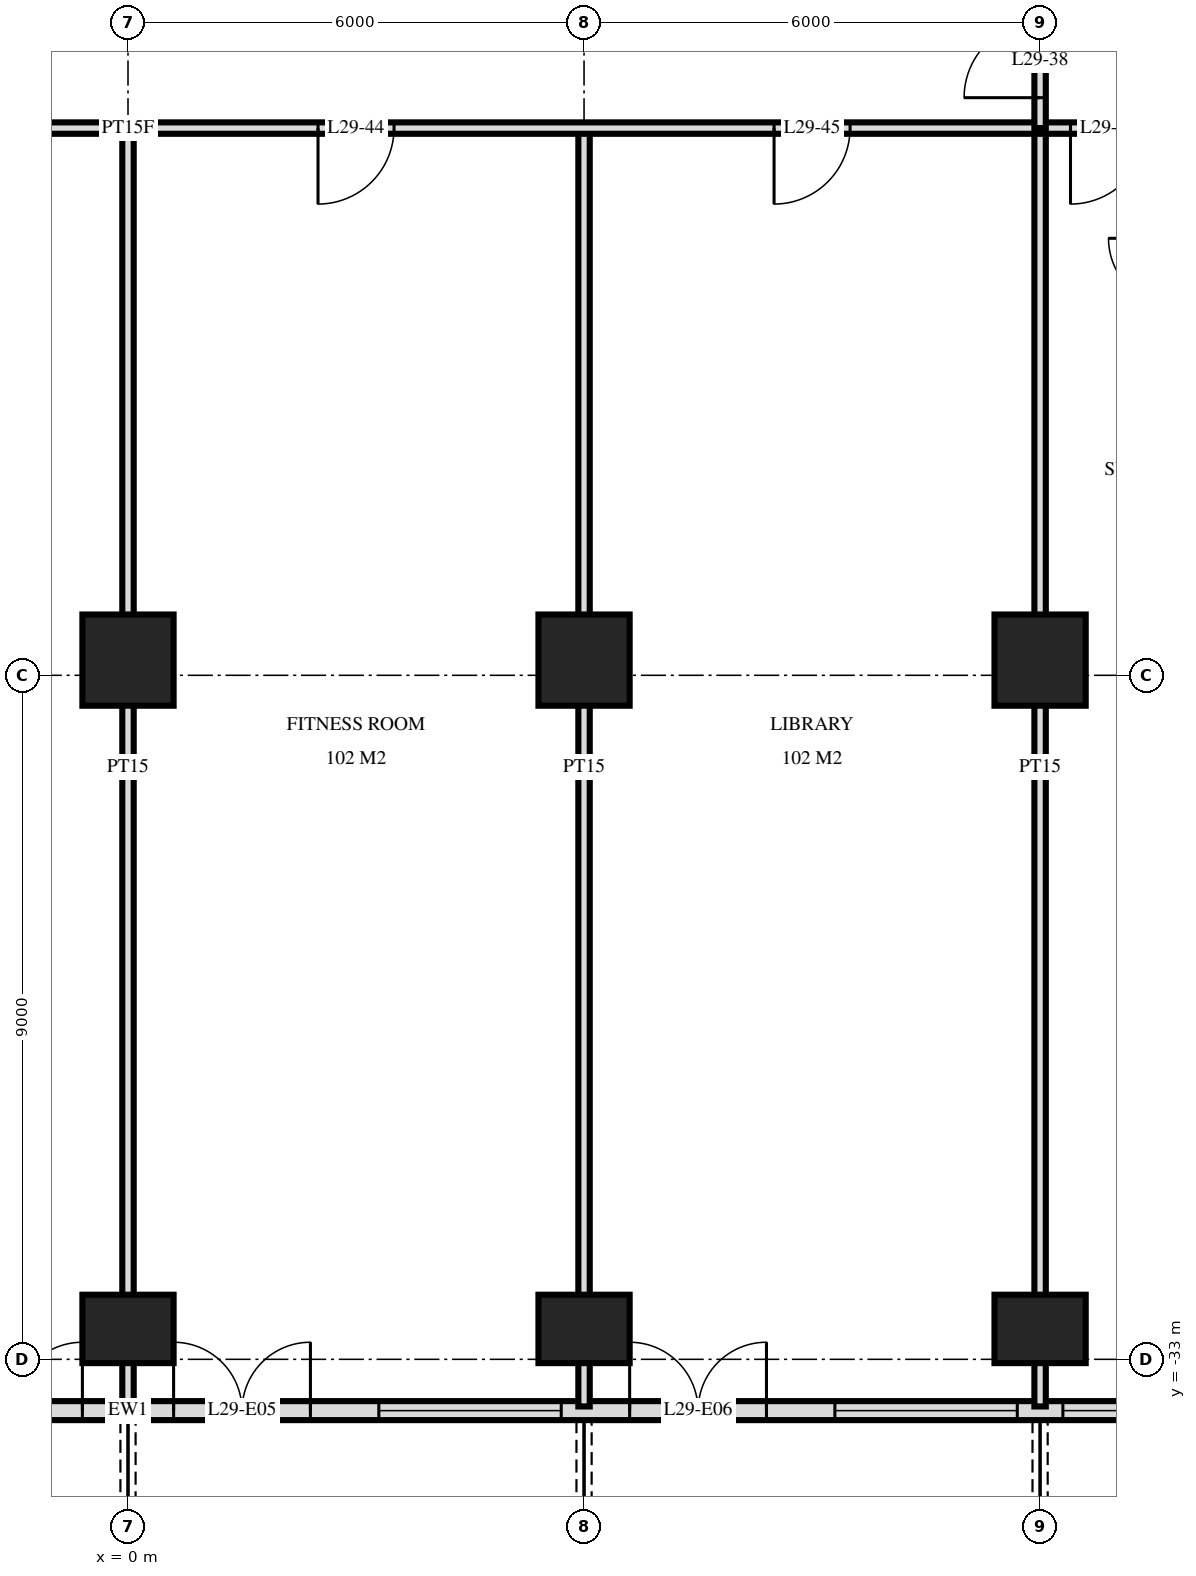
"""IFC4 building model, lengths in metres.
Left out: names, types, materials, properties, quantities, classifications, styles, units other than length and angle.
Written with IfcOpenShell. Run it as: python <this file> out.ifc"""

import sys

from ifc_helpers import new_model, si_unit, direction, frame, frame_2d, origin, origin_2d, place, context, subcontext, project, spatial, rectangle, extrude, element, fill, save


model = new_model("IFC4")
c1 = context("Model", 3, precision=1e-05, world=origin(), true_north=direction((0.0, 1.0)))
c2 = subcontext(c1, "Body", "Model", "MODEL_VIEW")
j1 = project(units=[si_unit("LENGTHUNIT", "METRE"), si_unit("PLANEANGLEUNIT", "RADIAN")], contexts=[c1])
p1 = place(None, origin())
s1 = spatial("IfcSite", under=j1, at=p1, CompositionType="ELEMENT")
p2 = place(p1, origin())
s2 = spatial("IfcBuilding", under=s1, at=p2, CompositionType="ELEMENT")
p3 = place(p2, frame((0.0, 0.0, 116.4)))
s3 = spatial("IfcBuildingStorey", under=s2, at=p3, CompositionType="ELEMENT", Elevation=116.4)
p4 = place(p3, frame((0.0, -32.6, 0.0), z_axis=(0.0, 0.0, 1.0), x_axis=(1.0, 0.0, 0.0)))
e1 = element("IfcColumn", 1, at=p4, inside=s3, PredefinedType="COLUMN", context=c2, shape_type="SweptSolid", body=[
    extrude(rectangle(XDim=1.2, YDim=0.9, at=origin_2d()), origin(), (0.0, 0.0, 1.0), 3.6),
])
p5 = place(p3, frame((0.0, -23.8, 0.0), z_axis=(0.0, 0.0, 1.0), x_axis=(1.0, 0.0, 0.0)))
e2 = element("IfcColumn", 2, at=p5, inside=s3, PredefinedType="COLUMN", context=c2, shape_type="SweptSolid", body=[
    extrude(rectangle(XDim=1.2, YDim=1.2, at=origin_2d()), origin(), (0.0, 0.0, 1.0), 3.6),
])
p6 = place(p3, frame((6.0, -32.6, 0.0), z_axis=(0.0, 0.0, 1.0), x_axis=(1.0, 0.0, 0.0)))
e3 = element("IfcColumn", 3, at=p6, inside=s3, PredefinedType="COLUMN", context=c2, shape_type="SweptSolid", body=[
    extrude(rectangle(XDim=1.2, YDim=0.9, at=origin_2d()), origin(), (0.0, 0.0, 1.0), 3.6),
])
p7 = place(p3, frame((6.0, -23.8, 0.0), z_axis=(0.0, 0.0, 1.0), x_axis=(1.0, 0.0, 0.0)))
e4 = element("IfcColumn", 4, at=p7, inside=s3, PredefinedType="COLUMN", context=c2, shape_type="SweptSolid", body=[
    extrude(rectangle(XDim=1.2, YDim=1.2, at=origin_2d()), origin(), (0.0, 0.0, 1.0), 3.6),
])
p8 = place(p3, frame((12.0, -32.6, 0.0), z_axis=(0.0, 0.0, 1.0), x_axis=(1.0, 0.0, 0.0)))
e5 = element("IfcColumn", 5, at=p8, inside=s3, PredefinedType="COLUMN", context=c2, shape_type="SweptSolid", body=[
    extrude(rectangle(XDim=1.2, YDim=0.9, at=origin_2d()), origin(), (0.0, 0.0, 1.0), 3.6),
])
p9 = place(p3, frame((12.0, -23.8, 0.0), z_axis=(0.0, 0.0, 1.0), x_axis=(1.0, 0.0, 0.0)))
e6 = element("IfcColumn", 6, at=p9, inside=s3, PredefinedType="COLUMN", context=c2, shape_type="SweptSolid", body=[
    extrude(rectangle(XDim=1.2, YDim=1.2, at=origin_2d()), origin(), (0.0, 0.0, 1.0), 3.6),
])
p10 = place(p3, frame((-23.675, -33.675, 0.0), z_axis=(0.0, 0.0, 1.0), x_axis=(1.0, 0.0, 0.0)))
e7 = element("IfcWall", 7, at=p10, inside=s3, PredefinedType="SOLIDWALL", context=c2, shape_type="SweptSolid", body=[
    extrude(rectangle(XDim=47.351, YDim=0.25, at=frame_2d((23.675, 0.0))), origin(), (0.0, 0.0, 1.0), 3.32),
])
p11 = place(p10, frame((0.275, 0.0, 0.3)))
e8 = element("IfcOpeningElement", 8, at=p11, cuts=e7, PredefinedType="OPENING", context=c2, shape_type="SweptSolid", body=[
    extrude(rectangle(XDim=2.4, YDim=2.1, at=frame_2d((1.2, 1.05))), frame((0.0, 0.135, 0.0), z_axis=(0.0, -1.0, 0.0), x_axis=(1.0, 0.0, 0.0)), (0.0, 0.0, 1.0), 0.27),
])
p12 = place(p10, frame((3.425, 0.0, 0.0)))
e9 = element("IfcOpeningElement", 9, at=p12, cuts=e7, PredefinedType="OPENING", context=c2, shape_type="SweptSolid", body=[
    extrude(rectangle(XDim=1.8, YDim=2.4, at=frame_2d((0.9, 1.2))), frame((0.0, 0.135, 0.0), z_axis=(0.0, -1.0, 0.0), x_axis=(1.0, 0.0, 0.0)), (0.0, 0.0, 1.0), 0.27),
])
p13 = place(p10, frame((5.975, 0.0, 0.3)))
e10 = element("IfcOpeningElement", 10, at=p13, cuts=e7, PredefinedType="OPENING", context=c2, shape_type="SweptSolid", body=[
    extrude(rectangle(XDim=2.4, YDim=2.1, at=frame_2d((1.2, 1.05))), frame((0.0, 0.135, 0.0), z_axis=(0.0, -1.0, 0.0), x_axis=(1.0, 0.0, 0.0)), (0.0, 0.0, 1.0), 0.27),
])
p14 = place(p10, frame((9.275, 0.0, 0.0)))
e11 = element("IfcOpeningElement", 11, at=p14, cuts=e7, PredefinedType="OPENING", context=c2, shape_type="SweptSolid", body=[
    extrude(rectangle(XDim=1.8, YDim=2.4, at=frame_2d((0.9, 1.2))), frame((0.0, 0.135, 0.0), z_axis=(0.0, -1.0, 0.0), x_axis=(1.0, 0.0, 0.0)), (0.0, 0.0, 1.0), 0.27),
])
p15 = place(p10, frame((12.275, 0.0, 0.0)))
e12 = element("IfcOpeningElement", 12, at=p15, cuts=e7, PredefinedType="OPENING", context=c2, shape_type="SweptSolid", body=[
    extrude(rectangle(XDim=1.8, YDim=2.4, at=frame_2d((0.9, 1.2))), frame((0.0, 0.135, 0.0), z_axis=(0.0, -1.0, 0.0), x_axis=(1.0, 0.0, 0.0)), (0.0, 0.0, 1.0), 0.27),
])
p16 = place(p10, frame((14.975, 0.0, 0.3)))
e13 = element("IfcOpeningElement", 13, at=p16, cuts=e7, PredefinedType="OPENING", context=c2, shape_type="SweptSolid", body=[
    extrude(rectangle(XDim=2.4, YDim=2.1, at=frame_2d((1.2, 1.05))), frame((0.0, 0.135, 0.0), z_axis=(0.0, -1.0, 0.0), x_axis=(1.0, 0.0, 0.0)), (0.0, 0.0, 1.0), 0.27),
])
p17 = place(p10, frame((17.975, 0.0, 0.3)))
e14 = element("IfcOpeningElement", 14, at=p17, cuts=e7, PredefinedType="OPENING", context=c2, shape_type="SweptSolid", body=[
    extrude(rectangle(XDim=2.4, YDim=2.1, at=frame_2d((1.2, 1.05))), frame((0.0, 0.135, 0.0), z_axis=(0.0, -1.0, 0.0), x_axis=(1.0, 0.0, 0.0)), (0.0, 0.0, 1.0), 0.27),
])
p18 = place(p10, frame((21.275, 0.0, 0.0)))
e15 = element("IfcOpeningElement", 15, at=p18, cuts=e7, PredefinedType="OPENING", context=c2, shape_type="SweptSolid", body=[
    extrude(rectangle(XDim=1.8, YDim=2.4, at=frame_2d((0.9, 1.2))), frame((0.0, 0.135, 0.0), z_axis=(0.0, -1.0, 0.0), x_axis=(1.0, 0.0, 0.0)), (0.0, 0.0, 1.0), 0.27),
])
p19 = place(p10, frame((24.275, 0.0, 0.0)))
e16 = element("IfcOpeningElement", 16, at=p19, cuts=e7, PredefinedType="OPENING", context=c2, shape_type="SweptSolid", body=[
    extrude(rectangle(XDim=1.8, YDim=2.4, at=frame_2d((0.9, 1.2))), frame((0.0, 0.135, 0.0), z_axis=(0.0, -1.0, 0.0), x_axis=(1.0, 0.0, 0.0)), (0.0, 0.0, 1.0), 0.27),
])
p20 = place(p10, frame((26.975, 0.0, 0.3)))
e17 = element("IfcOpeningElement", 17, at=p20, cuts=e7, PredefinedType="OPENING", context=c2, shape_type="SweptSolid", body=[
    extrude(rectangle(XDim=2.4, YDim=2.1, at=frame_2d((1.2, 1.05))), frame((0.0, 0.135, 0.0), z_axis=(0.0, -1.0, 0.0), x_axis=(1.0, 0.0, 0.0)), (0.0, 0.0, 1.0), 0.27),
])
p21 = place(p10, frame((30.275, 0.0, 0.0)))
e18 = element("IfcOpeningElement", 18, at=p21, cuts=e7, PredefinedType="OPENING", context=c2, shape_type="SweptSolid", body=[
    extrude(rectangle(XDim=1.8, YDim=2.4, at=frame_2d((0.9, 1.2))), frame((0.0, 0.135, 0.0), z_axis=(0.0, -1.0, 0.0), x_axis=(1.0, 0.0, 0.0)), (0.0, 0.0, 1.0), 0.27),
])
p22 = place(p10, frame((32.975, 0.0, 0.3)))
e19 = element("IfcOpeningElement", 19, at=p22, cuts=e7, PredefinedType="OPENING", context=c2, shape_type="SweptSolid", body=[
    extrude(rectangle(XDim=2.4, YDim=2.1, at=frame_2d((1.2, 1.05))), frame((0.0, 0.135, 0.0), z_axis=(0.0, -1.0, 0.0), x_axis=(1.0, 0.0, 0.0)), (0.0, 0.0, 1.0), 0.27),
])
p23 = place(p10, frame((35.975, 0.0, 0.3)))
e20 = element("IfcOpeningElement", 20, at=p23, cuts=e7, PredefinedType="OPENING", context=c2, shape_type="SweptSolid", body=[
    extrude(rectangle(XDim=2.4, YDim=2.1, at=frame_2d((1.2, 1.05))), frame((0.0, 0.135, 0.0), z_axis=(0.0, -1.0, 0.0), x_axis=(1.0, 0.0, 0.0)), (0.0, 0.0, 1.0), 0.27),
])
p24 = place(p10, frame((39.275, 0.0, 0.0)))
e21 = element("IfcOpeningElement", 21, at=p24, cuts=e7, PredefinedType="OPENING", context=c2, shape_type="SweptSolid", body=[
    extrude(rectangle(XDim=1.8, YDim=2.4, at=frame_2d((0.9, 1.2))), frame((0.0, 0.135, 0.0), z_axis=(0.0, -1.0, 0.0), x_axis=(1.0, 0.0, 0.0)), (0.0, 0.0, 1.0), 0.27),
])
p25 = place(p10, frame((41.975, 0.0, 0.3)))
e22 = element("IfcOpeningElement", 22, at=p25, cuts=e7, PredefinedType="OPENING", context=c2, shape_type="SweptSolid", body=[
    extrude(rectangle(XDim=2.4, YDim=2.1, at=frame_2d((1.2, 1.05))), frame((0.0, 0.135, 0.0), z_axis=(0.0, -1.0, 0.0), x_axis=(1.0, 0.0, 0.0)), (0.0, 0.0, 1.0), 0.27),
])
p26 = place(p10, frame((45.125, 0.0, 0.0)))
e23 = element("IfcOpeningElement", 23, at=p26, cuts=e7, PredefinedType="OPENING", context=c2, shape_type="SweptSolid", body=[
    extrude(rectangle(XDim=1.8, YDim=2.4, at=frame_2d((0.9, 1.2))), frame((0.0, 0.135, 0.0), z_axis=(0.0, -1.0, 0.0), x_axis=(1.0, 0.0, 0.0)), (0.0, 0.0, 1.0), 0.27),
])
p27 = place(p3, frame((12.0, -16.8, 0.0), z_axis=(0.0, 0.0, 1.0), x_axis=(0.0, 1.0, 0.0)))
e24 = element("IfcWall", 24, at=p27, inside=s3, PredefinedType="PARTITIONING", context=c2, shape_type="SweptSolid", body=[
    extrude(rectangle(XDim=1.75, YDim=0.15, at=frame_2d((0.875, 0.0))), origin(), (0.0, 0.0, 1.0), 3.32),
])
p28 = place(p27, frame((0.4, 0.0, 0.0)))
e25 = element("IfcOpeningElement", 25, at=p28, cuts=e24, PredefinedType="OPENING", context=c2, shape_type="SweptSolid", body=[
    extrude(rectangle(XDim=1.0, YDim=2.1, at=frame_2d((0.5, 1.05))), frame((0.0, 0.085, 0.0), z_axis=(0.0, -1.0, 0.0), x_axis=(1.0, 0.0, 0.0)), (0.0, 0.0, 1.0), 0.17),
])
for number, where, z_axis, x_axis in (
    (26, (12.0, -33.62, 0.0), (0.0, 0.0, 1.0), (0.0, 1.0, 0.0)),
    (27, (6.0, -33.62, 0.0), (0.0, 0.0, 1.0), (0.0, 1.0, 0.0)),
    (28, (0.0, -33.62, 0.0), (0.0, 0.0, 1.0), (0.0, 1.0, 0.0)),
):
    element("IfcWall", number, at=place(p3, frame(where, z_axis=z_axis, x_axis=x_axis)), inside=s3, PredefinedType="PARTITIONING", context=c2, shape_type="SweptSolid", body=[
        extrude(rectangle(XDim=16.82, YDim=0.15, at=frame_2d((8.41, 0.0))), origin(), (0.0, 0.0, 1.0), 3.32),
    ])
p29 = place(p3, frame((-28.02, -16.8, 0.0), z_axis=(0.0, 0.0, 1.0), x_axis=(1.0, 0.0, 0.0)))
e29 = element("IfcWall", 29, at=p29, inside=s3, PredefinedType="PARTITIONING", context=c2, shape_type="SweptSolid", body=[
    extrude(rectangle(XDim=56.04, YDim=0.15, at=frame_2d((28.02, 0.0))), origin(), (0.0, 0.0, 1.0), 3.32),
])
p30 = place(p29, frame((13.17, 0.0, 0.0)))
e30 = element("IfcOpeningElement", 30, at=p30, cuts=e29, PredefinedType="OPENING", context=c2, shape_type="SweptSolid", body=[
    extrude(rectangle(XDim=1.0, YDim=2.1, at=frame_2d((0.5, 1.05))), frame((0.0, 0.085, 0.0), z_axis=(0.0, -1.0, 0.0), x_axis=(1.0, 0.0, 0.0)), (0.0, 0.0, 1.0), 0.17),
])
p31 = place(p29, frame((11.87, 0.0, 0.0)))
e31 = element("IfcOpeningElement", 31, at=p31, cuts=e29, PredefinedType="OPENING", context=c2, shape_type="SweptSolid", body=[
    extrude(rectangle(XDim=1.0, YDim=2.1, at=frame_2d((0.5, 1.05))), frame((0.0, 0.085, 0.0), z_axis=(0.0, -1.0, 0.0), x_axis=(1.0, 0.0, 0.0)), (0.0, 0.0, 1.0), 0.17),
])
p32 = place(p29, frame((8.32, 0.0, 0.0)))
e32 = element("IfcOpeningElement", 32, at=p32, cuts=e29, PredefinedType="OPENING", context=c2, shape_type="SweptSolid", body=[
    extrude(rectangle(XDim=1.0, YDim=2.1, at=frame_2d((0.5, 1.05))), frame((0.0, 0.085, 0.0), z_axis=(0.0, -1.0, 0.0), x_axis=(1.0, 0.0, 0.0)), (0.0, 0.0, 1.0), 0.17),
])
p33 = place(p29, frame((40.42, 0.0, 0.0)))
e33 = element("IfcOpeningElement", 33, at=p33, cuts=e29, PredefinedType="OPENING", context=c2, shape_type="SweptSolid", body=[
    extrude(rectangle(XDim=1.0, YDim=2.1, at=frame_2d((0.5, 1.05))), frame((0.0, 0.085, 0.0), z_axis=(0.0, -1.0, 0.0), x_axis=(1.0, 0.0, 0.0)), (0.0, 0.0, 1.0), 0.17),
])
p34 = place(p29, frame((46.72, 0.0, 0.0)))
e34 = element("IfcOpeningElement", 34, at=p34, cuts=e29, PredefinedType="OPENING", context=c2, shape_type="SweptSolid", body=[
    extrude(rectangle(XDim=1.0, YDim=2.1, at=frame_2d((0.5, 1.05))), frame((0.0, 0.085, 0.0), z_axis=(0.0, -1.0, 0.0), x_axis=(1.0, 0.0, 0.0)), (0.0, 0.0, 1.0), 0.17),
])
p35 = place(p29, frame((21.52, 0.0, 0.0)))
e35 = element("IfcOpeningElement", 35, at=p35, cuts=e29, PredefinedType="OPENING", context=c2, shape_type="SweptSolid", body=[
    extrude(rectangle(XDim=1.0, YDim=2.1, at=frame_2d((0.5, 1.05))), frame((0.0, 0.085, 0.0), z_axis=(0.0, -1.0, 0.0), x_axis=(1.0, 0.0, 0.0)), (0.0, 0.0, 1.0), 0.17),
])
p36 = place(p29, frame((30.52, 0.0, 0.0)))
e36 = element("IfcOpeningElement", 36, at=p36, cuts=e29, PredefinedType="OPENING", context=c2, shape_type="SweptSolid", body=[
    extrude(rectangle(XDim=1.0, YDim=2.1, at=frame_2d((0.5, 1.05))), frame((0.0, 0.085, 0.0), z_axis=(0.0, -1.0, 0.0), x_axis=(1.0, 0.0, 0.0)), (0.0, 0.0, 1.0), 0.17),
])
p37 = place(p29, frame((36.52, 0.0, 0.0)))
e37 = element("IfcOpeningElement", 37, at=p37, cuts=e29, PredefinedType="OPENING", context=c2, shape_type="SweptSolid", body=[
    extrude(rectangle(XDim=1.0, YDim=2.1, at=frame_2d((0.5, 1.05))), frame((0.0, 0.085, 0.0), z_axis=(0.0, -1.0, 0.0), x_axis=(1.0, 0.0, 0.0)), (0.0, 0.0, 1.0), 0.17),
])
p38 = place(p18, origin())
e38 = element("IfcDoor", 38, at=p38, inside=s3, OperationType="DOUBLE_DOOR_SINGLE_SWING", PredefinedType="DOOR", context=c2, shape_type="SweptSolid", body=[
    extrude(rectangle(XDim=1.8, YDim=2.4, at=frame_2d((0.9, 1.2))), frame((0.0, 0.025, 0.0), z_axis=(0.0, -1.0, 0.0), x_axis=(1.0, 0.0, 0.0)), (0.0, 0.0, 1.0), 0.05),
])
fill(e15, e38)
p39 = place(p19, origin())
e39 = element("IfcDoor", 39, at=p39, inside=s3, OperationType="DOUBLE_DOOR_SINGLE_SWING", PredefinedType="DOOR", context=c2, shape_type="SweptSolid", body=[
    extrude(rectangle(XDim=1.8, YDim=2.4, at=frame_2d((0.9, 1.2))), frame((0.0, 0.025, 0.0), z_axis=(0.0, -1.0, 0.0), x_axis=(1.0, 0.0, 0.0)), (0.0, 0.0, 1.0), 0.05),
])
fill(e16, e39)
p40 = place(p20, origin())
e40 = element("IfcWindow", 40, at=p40, inside=s3, PartitioningType="SINGLE_PANEL", PredefinedType="WINDOW", context=c2, shape_type="SweptSolid", body=[
    extrude(rectangle(XDim=2.4, YDim=2.1, at=frame_2d((1.2, 1.05))), frame((0.0, 0.03, 0.0), z_axis=(0.0, -1.0, 0.0), x_axis=(1.0, 0.0, 0.0)), (0.0, 0.0, 1.0), 0.06),
])
fill(e17, e40)
p41 = place(p21, origin())
e41 = element("IfcDoor", 41, at=p41, inside=s3, OperationType="DOUBLE_DOOR_SINGLE_SWING", PredefinedType="DOOR", context=c2, shape_type="SweptSolid", body=[
    extrude(rectangle(XDim=1.8, YDim=2.4, at=frame_2d((0.9, 1.2))), frame((0.0, 0.025, 0.0), z_axis=(0.0, -1.0, 0.0), x_axis=(1.0, 0.0, 0.0)), (0.0, 0.0, 1.0), 0.05),
])
fill(e18, e41)
p42 = place(p22, origin())
e42 = element("IfcWindow", 42, at=p42, inside=s3, PartitioningType="SINGLE_PANEL", PredefinedType="WINDOW", context=c2, shape_type="SweptSolid", body=[
    extrude(rectangle(XDim=2.4, YDim=2.1, at=frame_2d((1.2, 1.05))), frame((0.0, 0.03, 0.0), z_axis=(0.0, -1.0, 0.0), x_axis=(1.0, 0.0, 0.0)), (0.0, 0.0, 1.0), 0.06),
])
fill(e19, e42)
p43 = place(p23, origin())
e43 = element("IfcWindow", 43, at=p43, inside=s3, PartitioningType="SINGLE_PANEL", PredefinedType="WINDOW", context=c2, shape_type="SweptSolid", body=[
    extrude(rectangle(XDim=2.4, YDim=2.1, at=frame_2d((1.2, 1.05))), frame((0.0, 0.03, 0.0), z_axis=(0.0, -1.0, 0.0), x_axis=(1.0, 0.0, 0.0)), (0.0, 0.0, 1.0), 0.06),
])
fill(e20, e43)
p44 = place(p28, origin())
e44 = element("IfcDoor", 44, at=p44, inside=s3, OperationType="SINGLE_SWING_RIGHT", PredefinedType="DOOR", context=c2, shape_type="SweptSolid", body=[
    extrude(rectangle(XDim=1.0, YDim=2.1, at=frame_2d((0.5, 1.05))), frame((0.0, 0.025, 0.0), z_axis=(0.0, -1.0, 0.0), x_axis=(1.0, 0.0, 0.0)), (0.0, 0.0, 1.0), 0.05),
])
fill(e25, e44)
p45 = place(p33, frame((0.5, 0.0, 0.0), z_axis=(0.0, 0.0, 1.0), x_axis=(-1.0, 0.0, 0.0)))
e45 = element("IfcDoor", 45, at=p45, inside=s3, OperationType="SINGLE_SWING_LEFT", PredefinedType="DOOR", context=c2, shape_type="SweptSolid", body=[
    extrude(rectangle(XDim=1.0, YDim=2.1, at=frame_2d((0.0, 1.05))), frame((0.0, -0.025, 0.0), z_axis=(0.0, 1.0, 0.0), x_axis=(-1.0, 0.0, 0.0)), (0.0, 0.0, 1.0), 0.05),
])
fill(e33, e45)
p46 = place(p36, frame((0.5, 0.0, 0.0), z_axis=(0.0, 0.0, 1.0), x_axis=(-1.0, 0.0, 0.0)))
e46 = element("IfcDoor", 46, at=p46, inside=s3, OperationType="SINGLE_SWING_LEFT", PredefinedType="DOOR", context=c2, shape_type="SweptSolid", body=[
    extrude(rectangle(XDim=1.0, YDim=2.1, at=frame_2d((0.0, 1.05))), frame((0.0, -0.025, 0.0), z_axis=(0.0, 1.0, 0.0), x_axis=(-1.0, 0.0, 0.0)), (0.0, 0.0, 1.0), 0.05),
])
fill(e36, e46)
p47 = place(p37, frame((0.5, 0.0, 0.0), z_axis=(0.0, 0.0, 1.0), x_axis=(-1.0, 0.0, 0.0)))
e47 = element("IfcDoor", 47, at=p47, inside=s3, OperationType="SINGLE_SWING_LEFT", PredefinedType="DOOR", context=c2, shape_type="SweptSolid", body=[
    extrude(rectangle(XDim=1.0, YDim=2.1, at=frame_2d((0.0, 1.05))), frame((0.0, -0.025, 0.0), z_axis=(0.0, 1.0, 0.0), x_axis=(-1.0, 0.0, 0.0)), (0.0, 0.0, 1.0), 0.05),
])
fill(e37, e47)
save(model, sys.argv[1])
